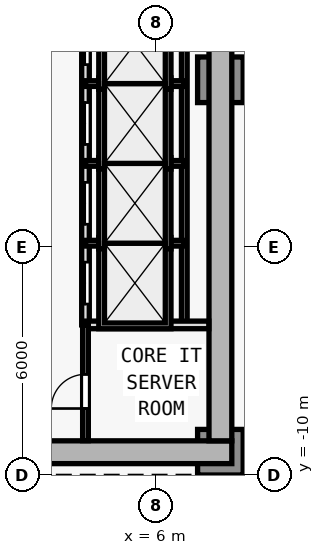
"""IFC4 building model, lengths in metres.
Left out: names, types, materials, properties, quantities, classifications, styles, units other than length and angle.
Written with IfcOpenShell. Run it as: python <this file> out.ifc"""

import sys

from ifc_helpers import new_model, si_unit, direction, frame, frame_2d, origin, origin_2d, place, context, subcontext, project, spatial, rectangle, extrude, element, fill, save


model = new_model("IFC4")
c1 = context("Model", 3, precision=1e-05, world=origin(), true_north=direction((0.0, 1.0)))
c2 = subcontext(c1, "Body", "Model", "MODEL_VIEW")
j1 = project(units=[si_unit("LENGTHUNIT", "METRE"), si_unit("PLANEANGLEUNIT", "RADIAN")], contexts=[c1])
p1 = place(None, origin())
s1 = spatial("IfcSite", under=j1, at=p1, CompositionType="ELEMENT")
p2 = place(p1, origin())
s2 = spatial("IfcBuilding", under=s1, at=p2, CompositionType="ELEMENT")
p3 = place(p2, origin())
s3 = spatial("IfcBuildingStorey", under=s2, at=p3, CompositionType="ELEMENT", Elevation=0.0)
for number, where, z_axis, x_axis in (
    (1, (7.7, -9.4, 0.0), (0.0, 0.0, 1.0), (1.0, 0.0, 0.0)),
    (2, (7.7, 0.4, 0.0), (0.0, 0.0, 1.0), (1.0, 0.0, 0.0)),
):
    element("IfcColumn", number, at=place(p3, frame(where, z_axis=z_axis, x_axis=x_axis)), inside=s3, PredefinedType="COLUMN", context=c2, shape_type="SweptSolid", body=[
        extrude(rectangle(XDim=1.2, YDim=1.2, at=origin_2d()), origin(), (0.0, 0.0, 1.0), 5.0),
    ])
p4 = place(p3, frame((-8.0, -9.4, 0.0), z_axis=(0.0, 0.0, 1.0), x_axis=(1.0, 0.0, 0.0)))
e3 = element("IfcWall", 3, at=p4, inside=s3, PredefinedType="SHEAR", context=c2, shape_type="SweptSolid", body=[
    extrude(rectangle(XDim=16.0, YDim=0.6, at=frame_2d((8.0, 0.0))), origin(), (0.0, 0.0, 1.0), 4.72),
])
p5 = place(p4, frame((9.65, 0.0, 0.0)))
e4 = element("IfcOpeningElement", 4, at=p5, cuts=e3, PredefinedType="OPENING", context=c2, shape_type="SweptSolid", body=[
    extrude(rectangle(XDim=1.5, YDim=2.2, at=frame_2d((0.75, 1.1))), frame((0.0, 0.31, 0.0), z_axis=(0.0, -1.0, 0.0), x_axis=(1.0, 0.0, 0.0)), (0.0, 0.0, 1.0), 0.62),
])
p6 = place(p3, frame((7.7, 9.9, 0.0), z_axis=(0.0, 0.0, 1.0), x_axis=(0.0, -1.0, 0.0)))
e5 = element("IfcWall", 5, at=p6, inside=s3, PredefinedType="SHEAR", context=c2, shape_type="SweptSolid", body=[
    extrude(rectangle(XDim=19.0, YDim=0.6, at=frame_2d((9.5, 0.0))), origin(), (0.0, 0.0, 1.0), 4.72),
])
p7 = place(p6, frame((5.95, 0.0, 0.0)))
e6 = element("IfcOpeningElement", 6, at=p7, cuts=e5, PredefinedType="OPENING", context=c2, shape_type="SweptSolid", body=[
    extrude(rectangle(XDim=1.1, YDim=2.15, at=frame_2d((0.55, 1.075))), frame((0.0, 0.31, 0.0), z_axis=(0.0, -1.0, 0.0), x_axis=(1.0, 0.0, 0.0)), (0.0, 0.0, 1.0), 0.62),
])
p8 = place(p3, frame((4.15, -6.05, 0.0), z_axis=(0.0, 0.0, 1.0), x_axis=(0.0, 1.0, 0.0)))
e7 = element("IfcWall", 7, at=p8, inside=s3, PredefinedType="SOLIDWALL", context=c2, shape_type="SweptSolid", body=[
    extrude(rectangle(XDim=8.7, YDim=0.2, at=frame_2d((4.35, 0.0))), origin(), (0.0, 0.0, 1.0), 4.72),
])
p9 = place(p8, frame((0.55, 0.0, 0.0)))
e8 = element("IfcOpeningElement", 8, at=p9, cuts=e7, PredefinedType="OPENING", context=c2, shape_type="SweptSolid", body=[
    extrude(rectangle(XDim=1.1, YDim=2.15, at=frame_2d((0.55, 1.075))), frame((0.0, 0.11, 0.0), z_axis=(0.0, -1.0, 0.0), x_axis=(1.0, 0.0, 0.0)), (0.0, 0.0, 1.0), 0.22),
])
p10 = place(p8, frame((2.65, 0.0, 0.0)))
e9 = element("IfcOpeningElement", 9, at=p10, cuts=e7, PredefinedType="OPENING", context=c2, shape_type="SweptSolid", body=[
    extrude(rectangle(XDim=1.1, YDim=2.15, at=frame_2d((0.55, 1.075))), frame((0.0, 0.11, 0.0), z_axis=(0.0, -1.0, 0.0), x_axis=(1.0, 0.0, 0.0)), (0.0, 0.0, 1.0), 0.22),
])
p11 = place(p8, frame((4.75, 0.0, 0.0)))
e10 = element("IfcOpeningElement", 10, at=p11, cuts=e7, PredefinedType="OPENING", context=c2, shape_type="SweptSolid", body=[
    extrude(rectangle(XDim=1.1, YDim=2.15, at=frame_2d((0.55, 1.075))), frame((0.0, 0.11, 0.0), z_axis=(0.0, -1.0, 0.0), x_axis=(1.0, 0.0, 0.0)), (0.0, 0.0, 1.0), 0.22),
])
p12 = place(p8, frame((6.85, 0.0, 0.0)))
e11 = element("IfcOpeningElement", 11, at=p12, cuts=e7, PredefinedType="OPENING", context=c2, shape_type="SweptSolid", body=[
    extrude(rectangle(XDim=1.1, YDim=2.15, at=frame_2d((0.55, 1.075))), frame((0.0, 0.11, 0.0), z_axis=(0.0, -1.0, 0.0), x_axis=(1.0, 0.0, 0.0)), (0.0, 0.0, 1.0), 0.22),
])
p13 = place(p3, frame((6.75, -6.05, 0.0), z_axis=(0.0, 0.0, 1.0), x_axis=(0.0, 1.0, 0.0)))
e12 = element("IfcWall", 12, at=p13, inside=s3, PredefinedType="PARTITIONING", context=c2, shape_type="SweptSolid", body=[
    extrude(rectangle(XDim=8.7, YDim=0.15, at=frame_2d((4.35, 0.0))), origin(), (0.0, 0.0, 1.0), 4.72),
])
for number, where, z_axis, x_axis in (
    (13, (4.15, -3.9, 0.0), (0.0, 0.0, 1.0), (1.0, 0.0, 0.0)),
    (14, (4.15, -1.8, 0.0), (0.0, 0.0, 1.0), (1.0, 0.0, 0.0)),
    (15, (4.15, 0.3, 0.0), (0.0, 0.0, 1.0), (1.0, 0.0, 0.0)),
):
    element("IfcWall", number, at=place(p3, frame(where, z_axis=z_axis, x_axis=x_axis)), inside=s3, PredefinedType="PARTITIONING", context=c2, shape_type="SweptSolid", body=[
        extrude(rectangle(XDim=2.6, YDim=0.15, at=frame_2d((1.3, 0.0))), origin(), (0.0, 0.0, 1.0), 4.72),
    ])
p14 = place(p3, frame((4.15, -6.05, 0.0), z_axis=(0.0, 0.0, 1.0), x_axis=(1.0, 0.0, 0.0)))
e16 = element("IfcWall", 16, at=p14, inside=s3, PredefinedType="SOLIDWALL", context=c2, shape_type="SweptSolid", body=[
    extrude(rectangle(XDim=3.245, YDim=0.2, at=frame_2d((1.623, 0.0))), origin(), (0.0, 0.0, 1.0), 4.72),
])
p15 = place(p3, frame((4.15, -9.095, 0.0), z_axis=(0.0, 0.0, 1.0), x_axis=(0.0, 1.0, 0.0)))
e17 = element("IfcWall", 17, at=p15, inside=s3, PredefinedType="PARTITIONING", context=c2, shape_type="SweptSolid", body=[
    extrude(rectangle(XDim=3.045, YDim=0.15, at=frame_2d((1.522, 0.0))), origin(), (0.0, 0.0, 1.0), 4.72),
])
p16 = place(p15, frame((0.845, 0.0, 0.0)))
e18 = element("IfcOpeningElement", 18, at=p16, cuts=e17, PredefinedType="OPENING", context=c2, shape_type="SweptSolid", body=[
    extrude(rectangle(XDim=0.9, YDim=2.1, at=frame_2d((0.45, 1.05))), frame((0.0, 0.085, 0.0), z_axis=(0.0, -1.0, 0.0), x_axis=(1.0, 0.0, 0.0)), (0.0, 0.0, 1.0), 0.17),
])
p17 = place(p9, origin())
e19 = element("IfcDoor", 19, at=p17, inside=s3, OperationType="DOUBLE_DOOR_SLIDING", PredefinedType="DOOR", context=c2, shape_type="SweptSolid", body=[
    extrude(rectangle(XDim=1.1, YDim=2.15, at=frame_2d((0.55, 1.075))), frame((0.0, 0.025, 0.0), z_axis=(0.0, -1.0, 0.0), x_axis=(1.0, 0.0, 0.0)), (0.0, 0.0, 1.0), 0.05),
])
fill(e8, e19)
p18 = place(p10, origin())
e20 = element("IfcDoor", 20, at=p18, inside=s3, OperationType="DOUBLE_DOOR_SLIDING", PredefinedType="DOOR", context=c2, shape_type="SweptSolid", body=[
    extrude(rectangle(XDim=1.1, YDim=2.15, at=frame_2d((0.55, 1.075))), frame((0.0, 0.025, 0.0), z_axis=(0.0, -1.0, 0.0), x_axis=(1.0, 0.0, 0.0)), (0.0, 0.0, 1.0), 0.05),
])
fill(e9, e20)
p19 = place(p11, origin())
e21 = element("IfcDoor", 21, at=p19, inside=s3, OperationType="DOUBLE_DOOR_SLIDING", PredefinedType="DOOR", context=c2, shape_type="SweptSolid", body=[
    extrude(rectangle(XDim=1.1, YDim=2.15, at=frame_2d((0.55, 1.075))), frame((0.0, 0.025, 0.0), z_axis=(0.0, -1.0, 0.0), x_axis=(1.0, 0.0, 0.0)), (0.0, 0.0, 1.0), 0.05),
])
fill(e10, e21)
p20 = place(p12, origin())
e22 = element("IfcDoor", 22, at=p20, inside=s3, OperationType="DOUBLE_DOOR_SLIDING", PredefinedType="DOOR", context=c2, shape_type="SweptSolid", body=[
    extrude(rectangle(XDim=1.1, YDim=2.15, at=frame_2d((0.55, 1.075))), frame((0.0, 0.025, 0.0), z_axis=(0.0, -1.0, 0.0), x_axis=(1.0, 0.0, 0.0)), (0.0, 0.0, 1.0), 0.05),
])
fill(e11, e22)
p21 = place(p16, origin())
e23 = element("IfcDoor", 23, at=p21, inside=s3, OperationType="SINGLE_SWING_LEFT", PredefinedType="DOOR", context=c2, shape_type="SweptSolid", body=[
    extrude(rectangle(XDim=0.9, YDim=2.1, at=frame_2d((0.45, 1.05))), frame((0.0, 0.025, 0.0), z_axis=(0.0, -1.0, 0.0), x_axis=(1.0, 0.0, 0.0)), (0.0, 0.0, 1.0), 0.05),
])
fill(e18, e23)
save(model, sys.argv[1])
